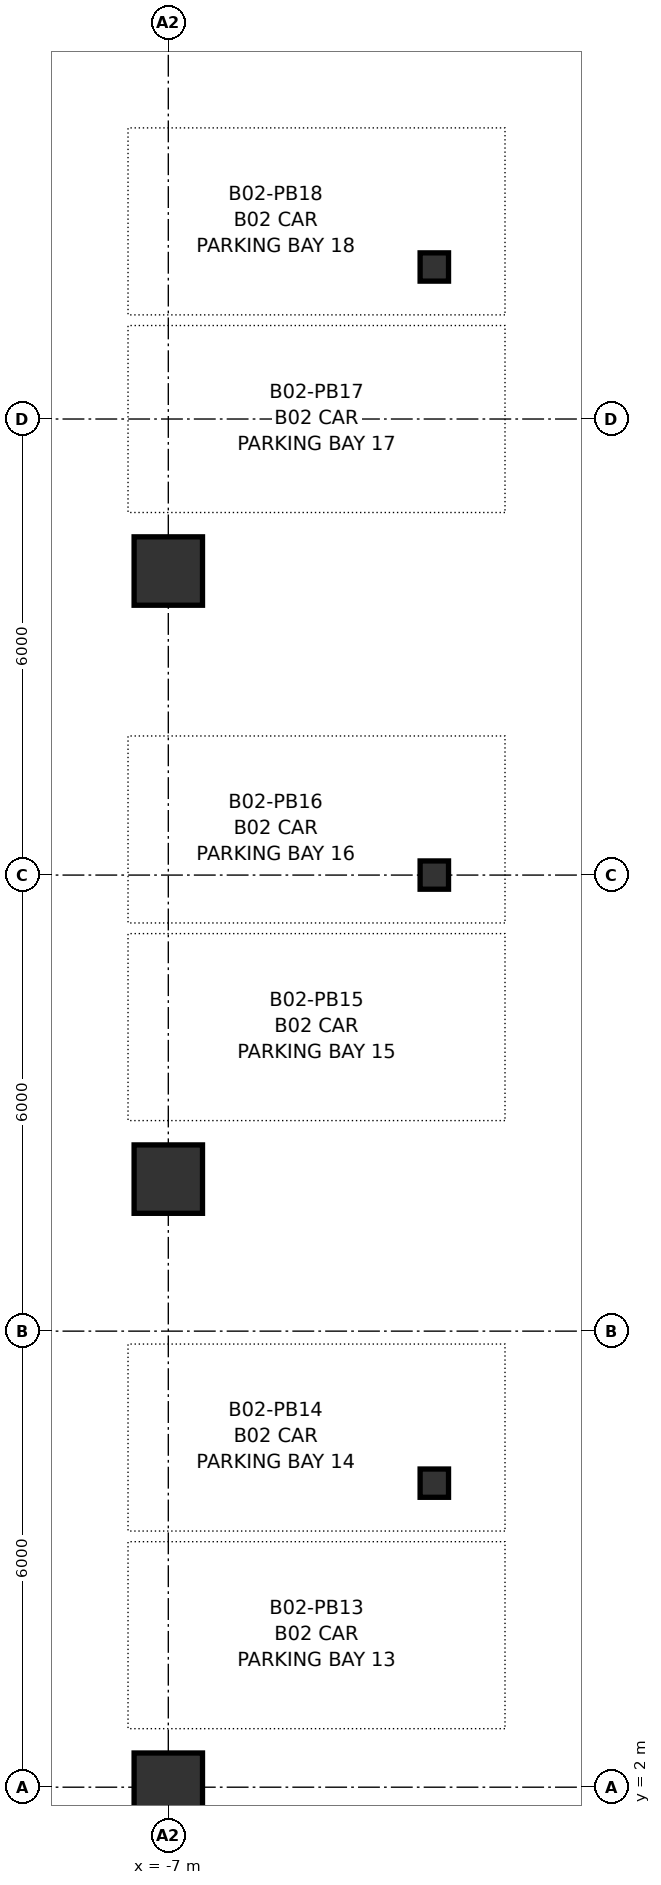
"""IFC4 building model, lengths in metres.
Left out: names, types, materials, properties, quantities, classifications, styles, units other than length and angle.
Written with IfcOpenShell. Run it as: python <this file> out.ifc"""

import sys

from ifc_helpers import new_model, si_unit, direction, frame, origin, origin_2d, place, context, subcontext, project, spatial, rectangle, i_section, extrude, source, transform, mapped, element, save


model = new_model("IFC4")
c1 = context("Model", 3, precision=1e-05, world=origin(), true_north=direction((0.0, 1.0)))
c2 = subcontext(c1, "Body", "Model", "MODEL_VIEW")
j1 = project(units=[si_unit("LENGTHUNIT", "METRE"), si_unit("PLANEANGLEUNIT", "RADIAN")], contexts=[c1])
p1 = place(None, origin())
s1 = spatial("IfcSite", under=j1, at=p1, CompositionType="ELEMENT")
p2 = place(p1, origin())
s2 = spatial("IfcBuilding", under=s1, at=p2, CompositionType="ELEMENT")
p3 = place(p2, frame((0.0, 0.0, -8.7)))
s3 = spatial("IfcBuildingStorey", under=s2, at=p3, CompositionType="ELEMENT", Elevation=-8.7)
m1 = source(origin(), c2, "Body", "SweptSolid", [
    extrude(i_section(OverallWidth=0.374, OverallDepth=0.372, WebThickness=0.016, FlangeThickness=0.026, FilletRadius=0.015, at=origin_2d()), origin(), (0.0, 0.0, 1.0), 4.2),
])
for number, where, z_axis, x_axis in (
    (1, (-3.5, 6.0, 0.0), (0.0, 0.0, 1.0), (1.0, 0.0, 0.0)),
    (2, (-3.5, 14.0, 0.0), (0.0, 0.0, 1.0), (1.0, 0.0, 0.0)),
    (3, (-3.5, 22.0, 0.0), (0.0, 0.0, 1.0), (1.0, 0.0, 0.0)),
):
    element("IfcColumn", number, at=place(p3, frame(where, z_axis=z_axis, x_axis=x_axis)), inside=s3, PredefinedType="PILASTER", context=c2, shape_type="MappedRepresentation", body=[
        mapped(m1, transform((0.0, 0.0, 0.0), x_axis=(1.0, 0.0, 0.0), y_axis=(0.0, 1.0, 0.0), z_axis=(0.0, 0.0, 1.0), scale=1.0)),
    ])
m2 = source(origin(), c2, "Body", "SweptSolid", [
    extrude(rectangle(XDim=0.9, YDim=0.9, at=origin_2d()), origin(), (0.0, 0.0, 1.0), 4.2),
])
for number, where, z_axis, x_axis in (
    (4, (-7.0, 2.0, 0.0), (0.0, 0.0, 1.0), (1.0, 0.0, 0.0)),
    (5, (-7.0, 10.0, 0.0), (0.0, 0.0, 1.0), (1.0, 0.0, 0.0)),
    (6, (-7.0, 18.0, 0.0), (0.0, 0.0, 1.0), (1.0, 0.0, 0.0)),
):
    element("IfcColumn", number, at=place(p3, frame(where, z_axis=z_axis, x_axis=x_axis)), inside=s3, PredefinedType="COLUMN", context=c2, shape_type="MappedRepresentation", body=[
        mapped(m2, transform((0.0, 0.0, 0.0), x_axis=(1.0, 0.0, 0.0), y_axis=(0.0, 1.0, 0.0), z_axis=(0.0, 0.0, 1.0), scale=1.0)),
    ])
save(model, sys.argv[1])
